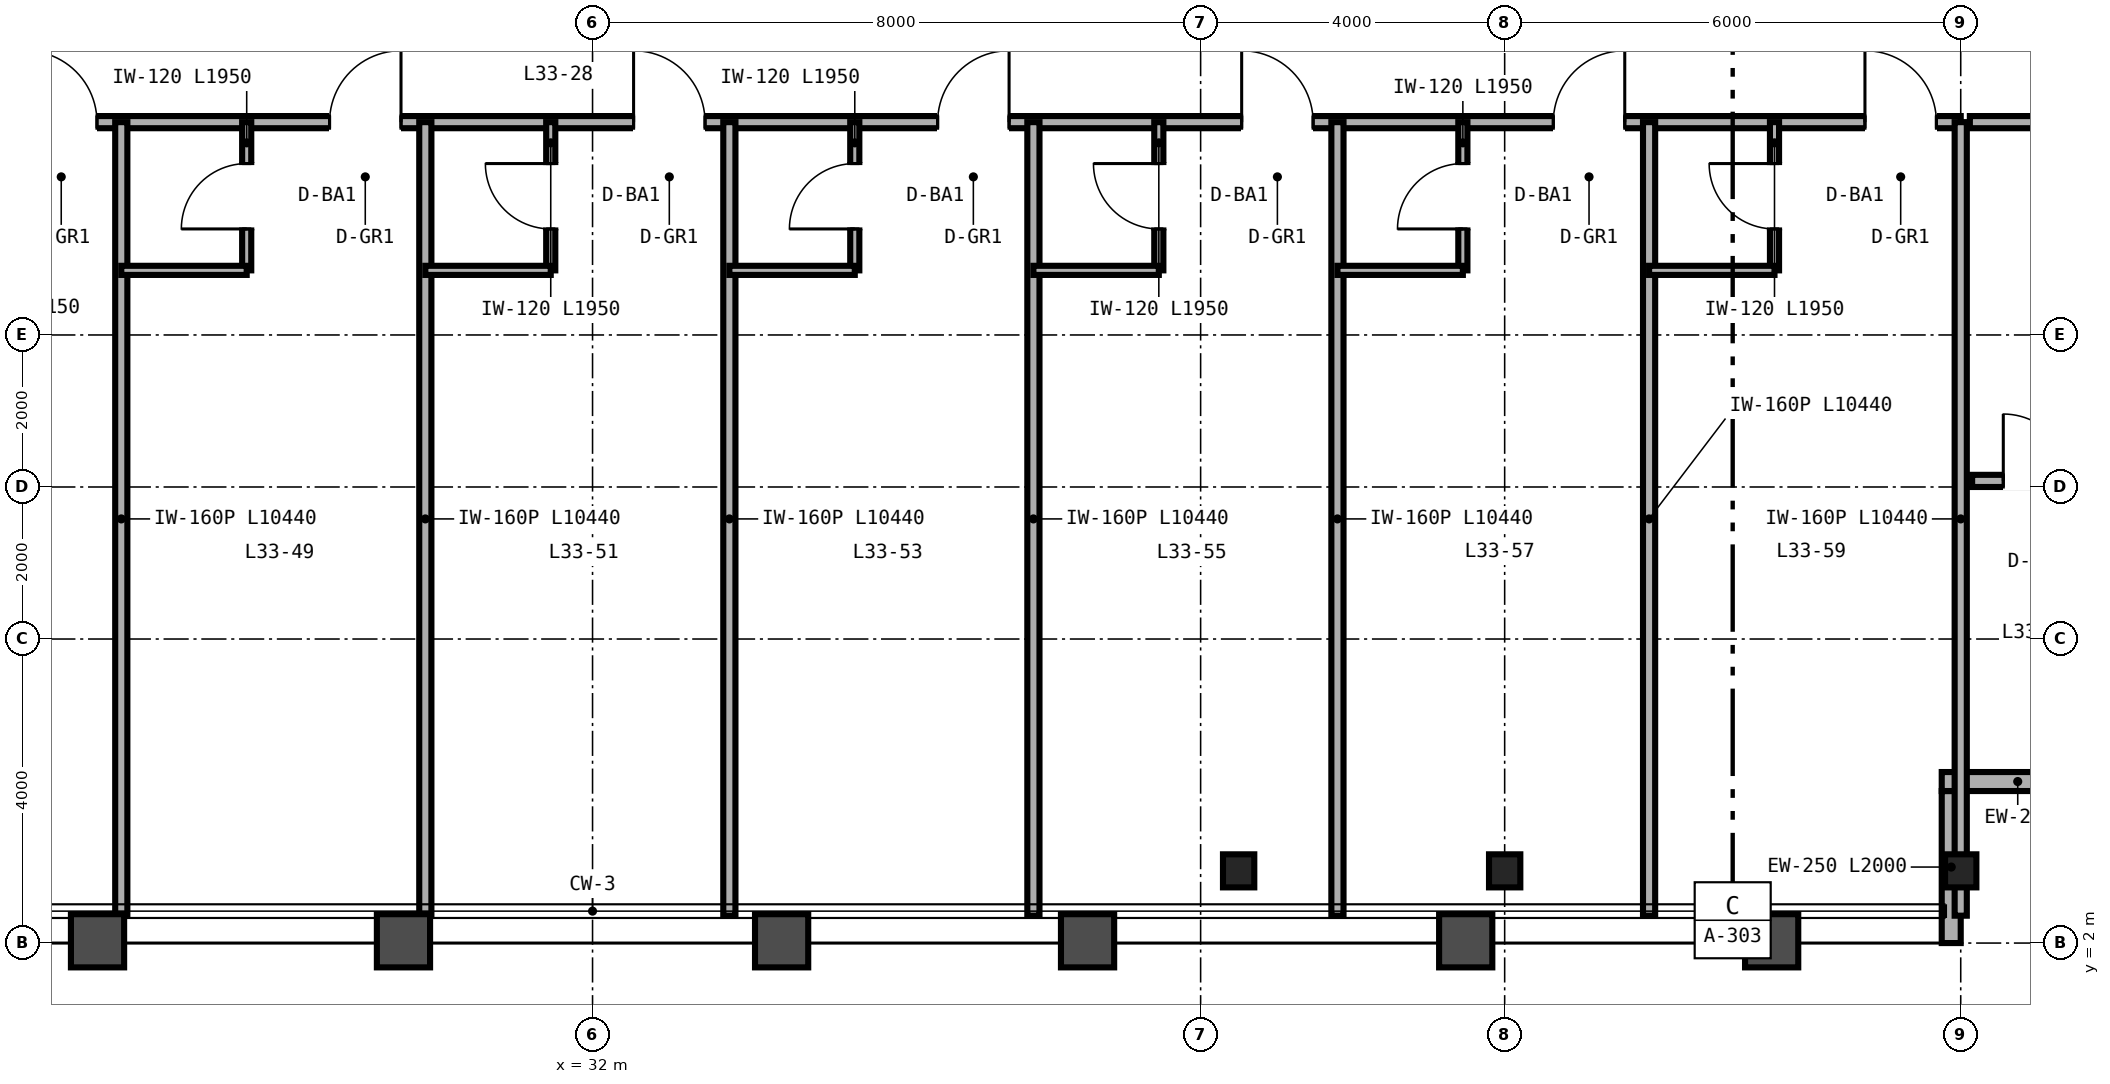
"""IFC4 building model, lengths in metres.
Left out: names, types, materials, properties, quantities, classifications, styles, units other than length and angle.
Written with IfcOpenShell. Run it as: python <this file> out.ifc"""

import sys

from ifc_helpers import new_model, si_unit, direction, frame, frame_2d, origin, origin_2d, place, context, subcontext, project, spatial, rectangle, i_section, extrude, source, transform, mapped, element, fill, save


model = new_model("IFC4")
c1 = context("Model", 3, precision=1e-05, world=origin(), true_north=direction((0.0, 1.0)))
c2 = subcontext(c1, "Body", "Model", "MODEL_VIEW")
j1 = project(units=[si_unit("LENGTHUNIT", "METRE"), si_unit("PLANEANGLEUNIT", "RADIAN")], contexts=[c1])
p1 = place(None, origin())
s1 = spatial("IfcSite", under=j1, at=p1, CompositionType="ELEMENT")
p2 = place(p1, origin())
s2 = spatial("IfcBuilding", under=s1, at=p2, CompositionType="ELEMENT")
p3 = place(p2, frame((0.0, 0.0, 133.2)))
s3 = spatial("IfcBuildingStorey", under=s2, at=p3, CompositionType="ELEMENT", Elevation=133.2)
m1 = source(origin(), c2, "Body", "SweptSolid", [
    extrude(i_section(OverallWidth=0.412, OverallDepth=0.435, WebThickness=0.036, FlangeThickness=0.057, FilletRadius=0.025, at=origin_2d()), origin(), (0.0, 0.0, 1.0), 3.36),
])
for number, where, z_axis, x_axis in (
    (1, (40.5, 2.95, 0.0), (0.0, 0.0, 1.0), (1.0, 0.0, 0.0)),
    (2, (44.0, 2.95, 0.0), (0.0, 0.0, 1.0), (1.0, 0.0, 0.0)),
    (3, (50.0, 2.95, 0.0), (0.0, 0.0, 1.0), (1.0, 0.0, 0.0)),
):
    element("IfcColumn", number, at=place(p3, frame(where, z_axis=z_axis, x_axis=x_axis)), inside=s3, PredefinedType="COLUMN", context=c2, shape_type="MappedRepresentation", body=[
        mapped(m1, transform((0.0, 0.0, 0.0), scale=1.0)),
    ])
p4 = place(p3, frame((49.875, 2.0, 0.0), z_axis=(0.0, 0.0, 1.0), x_axis=(0.0, 1.0, 0.0)))
e4 = element("IfcWall", 4, at=p4, inside=s3, PredefinedType="SOLIDWALL", context=c2, shape_type="SweptSolid", body=[
    extrude(rectangle(XDim=2.0, YDim=0.25, at=frame_2d((1.0, 0.0))), origin(), (0.0, 0.0, 1.0), 2.667),
])
p5 = place(p3, frame((49.75, 4.125, 0.0), z_axis=(0.0, 0.0, 1.0), x_axis=(1.0, 0.0, 0.0)))
e5 = element("IfcWall", 5, at=p5, inside=s3, PredefinedType="SOLIDWALL", context=c2, shape_type="SweptSolid", body=[
    extrude(rectangle(XDim=2.0, YDim=0.25, at=frame_2d((1.0, 0.0))), origin(), (0.0, 0.0, 1.0), 3.36),
])
p6 = place(p3, frame((50.12, 12.8, 0.0), z_axis=(0.0, 0.0, 1.0), x_axis=(1.0, 0.0, 0.0)))
e6 = element("IfcWall", 6, at=p6, inside=s3, PredefinedType="PARTITIONING", context=c2, shape_type="SweptSolid", body=[
    extrude(rectangle(XDim=5.68, YDim=0.16, at=frame_2d((2.84, 0.0))), origin(), (0.0, 0.0, 1.0), 3.36),
])
p7 = place(p6, frame((2.36, 0.0, 0.0)))
e7 = element("IfcOpeningElement", 7, at=p7, cuts=e6, PredefinedType="OPENING", context=c2, shape_type="SweptSolid", body=[
    extrude(rectangle(XDim=0.96, YDim=2.15, at=frame_2d((0.48, 1.075))), frame((0.0, 0.09, 0.0), z_axis=(0.0, -1.0, 0.0), x_axis=(1.0, 0.0, 0.0)), (0.0, 0.0, 1.0), 0.18),
])
p8 = place(p3, frame((50.15, 8.08, 0.0), z_axis=(0.0, 0.0, 1.0), x_axis=(1.0, 0.0, 0.0)))
e8 = element("IfcWall", 8, at=p8, inside=s3, PredefinedType="PARTITIONING", context=c2, shape_type="SweptSolid", body=[
    extrude(rectangle(XDim=1.7, YDim=0.16, at=frame_2d((0.85, 0.0))), origin(), (0.0, 0.0, 1.0), 3.36),
])
p9 = place(p8, frame((0.41, 0.0, 0.0)))
e9 = element("IfcOpeningElement", 9, at=p9, cuts=e8, PredefinedType="OPENING", context=c2, shape_type="SweptSolid", body=[
    extrude(rectangle(XDim=0.88, YDim=2.15, at=frame_2d((0.44, 1.075))), frame((0.0, 0.09, 0.0), z_axis=(0.0, -1.0, 0.0), x_axis=(1.0, 0.0, 0.0)), (0.0, 0.0, 1.0), 0.18),
])
p10 = place(p3, frame((14.0, 12.8, 0.0), z_axis=(0.0, 0.0, 1.0), x_axis=(1.0, 0.0, 0.0)))
e10 = element("IfcWall", 10, at=p10, inside=s3, PredefinedType="PARTITIONING", context=c2, shape_type="SweptSolid", body=[
    extrude(rectangle(XDim=36.0, YDim=0.16, at=frame_2d((18.0, 0.0))), origin(), (0.0, 0.0, 1.0), 2.581),
])
p11 = place(p10, frame((2.64, 0.0, 0.0)))
e11 = element("IfcOpeningElement", 11, at=p11, cuts=e10, PredefinedType="OPENING", context=c2, shape_type="SweptSolid", body=[
    extrude(rectangle(XDim=0.94, YDim=2.15, at=frame_2d((0.47, 1.075))), frame((0.0, 0.09, 0.0), z_axis=(0.0, -1.0, 0.0), x_axis=(1.0, 0.0, 0.0)), (0.0, 0.0, 1.0), 0.18),
])
p12 = place(p10, frame((6.54, 0.0, 0.0)))
e12 = element("IfcOpeningElement", 12, at=p12, cuts=e10, PredefinedType="OPENING", context=c2, shape_type="SweptSolid", body=[
    extrude(rectangle(XDim=0.94, YDim=2.15, at=frame_2d((0.47, 1.075))), frame((0.0, 0.09, 0.0), z_axis=(0.0, -1.0, 0.0), x_axis=(1.0, 0.0, 0.0)), (0.0, 0.0, 1.0), 0.18),
])
p13 = place(p10, frame((10.54, 0.0, 0.0)))
e13 = element("IfcOpeningElement", 13, at=p13, cuts=e10, PredefinedType="OPENING", context=c2, shape_type="SweptSolid", body=[
    extrude(rectangle(XDim=0.94, YDim=2.15, at=frame_2d((0.47, 1.075))), frame((0.0, 0.09, 0.0), z_axis=(0.0, -1.0, 0.0), x_axis=(1.0, 0.0, 0.0)), (0.0, 0.0, 1.0), 0.18),
])
p14 = place(p10, frame((14.54, 0.0, 0.0)))
e14 = element("IfcOpeningElement", 14, at=p14, cuts=e10, PredefinedType="OPENING", context=c2, shape_type="SweptSolid", body=[
    extrude(rectangle(XDim=0.94, YDim=2.15, at=frame_2d((0.47, 1.075))), frame((0.0, 0.09, 0.0), z_axis=(0.0, -1.0, 0.0), x_axis=(1.0, 0.0, 0.0)), (0.0, 0.0, 1.0), 0.18),
])
p15 = place(p10, frame((18.54, 0.0, 0.0)))
e15 = element("IfcOpeningElement", 15, at=p15, cuts=e10, PredefinedType="OPENING", context=c2, shape_type="SweptSolid", body=[
    extrude(rectangle(XDim=0.94, YDim=2.15, at=frame_2d((0.47, 1.075))), frame((0.0, 0.09, 0.0), z_axis=(0.0, -1.0, 0.0), x_axis=(1.0, 0.0, 0.0)), (0.0, 0.0, 1.0), 0.18),
])
p16 = place(p10, frame((22.54, 0.0, 0.0)))
e16 = element("IfcOpeningElement", 16, at=p16, cuts=e10, PredefinedType="OPENING", context=c2, shape_type="SweptSolid", body=[
    extrude(rectangle(XDim=0.94, YDim=2.15, at=frame_2d((0.47, 1.075))), frame((0.0, 0.09, 0.0), z_axis=(0.0, -1.0, 0.0), x_axis=(1.0, 0.0, 0.0)), (0.0, 0.0, 1.0), 0.18),
])
p17 = place(p10, frame((26.54, 0.0, 0.0)))
e17 = element("IfcOpeningElement", 17, at=p17, cuts=e10, PredefinedType="OPENING", context=c2, shape_type="SweptSolid", body=[
    extrude(rectangle(XDim=0.94, YDim=2.15, at=frame_2d((0.47, 1.075))), frame((0.0, 0.09, 0.0), z_axis=(0.0, -1.0, 0.0), x_axis=(1.0, 0.0, 0.0)), (0.0, 0.0, 1.0), 0.18),
])
p18 = place(p10, frame((30.64, 0.0, 0.0)))
e18 = element("IfcOpeningElement", 18, at=p18, cuts=e10, PredefinedType="OPENING", context=c2, shape_type="SweptSolid", body=[
    extrude(rectangle(XDim=0.94, YDim=2.15, at=frame_2d((0.47, 1.075))), frame((0.0, 0.09, 0.0), z_axis=(0.0, -1.0, 0.0), x_axis=(1.0, 0.0, 0.0)), (0.0, 0.0, 1.0), 0.18),
])
p19 = place(p10, frame((34.74, 0.0, 0.0)))
e19 = element("IfcOpeningElement", 19, at=p19, cuts=e10, PredefinedType="OPENING", context=c2, shape_type="SweptSolid", body=[
    extrude(rectangle(XDim=0.94, YDim=2.15, at=frame_2d((0.47, 1.075))), frame((0.0, 0.09, 0.0), z_axis=(0.0, -1.0, 0.0), x_axis=(1.0, 0.0, 0.0)), (0.0, 0.0, 1.0), 0.18),
])
p20 = place(p3, frame((50.0, 2.36, 0.0), z_axis=(0.0, 0.0, 1.0), x_axis=(0.0, 1.0, 0.0)))
e20 = element("IfcWall", 20, at=p20, inside=s3, PredefinedType="PARTITIONING", context=c2, shape_type="SweptSolid", body=[
    extrude(rectangle(XDim=10.44, YDim=0.16, at=frame_2d((5.22, 0.0))), origin(), (0.0, 0.0, 1.0), 2.667),
])
for number, where, z_axis, x_axis in (
    (21, (25.8, 2.36, 0.0), (0.0, 0.0, 1.0), (0.0, 1.0, 0.0)),
    (22, (29.8, 2.36, 0.0), (0.0, 0.0, 1.0), (0.0, 1.0, 0.0)),
):
    element("IfcWall", number, at=place(p3, frame(where, z_axis=z_axis, x_axis=x_axis)), inside=s3, PredefinedType="PARTITIONING", context=c2, shape_type="SweptSolid", body=[
        extrude(rectangle(XDim=10.44, YDim=0.16, at=frame_2d((5.22, 0.0))), origin(), (0.0, 0.0, 1.0), 2.433),
    ])
p21 = place(p3, frame((27.45, 10.85, 0.0), z_axis=(0.0, 0.0, 1.0), x_axis=(0.0, 1.0, 0.0)))
e23 = element("IfcWall", 23, at=p21, inside=s3, PredefinedType="PARTITIONING", context=c2, shape_type="SweptSolid", body=[
    extrude(rectangle(XDim=1.95, YDim=0.12, at=frame_2d((0.975, 0.0))), origin(), (0.0, 0.0, 1.0), 3.36),
])
p22 = place(p21, frame((0.545, 0.0, 0.0)))
e24 = element("IfcOpeningElement", 24, at=p22, cuts=e23, PredefinedType="OPENING", context=c2, shape_type="SweptSolid", body=[
    extrude(rectangle(XDim=0.86, YDim=2.1, at=frame_2d((0.43, 1.05))), frame((0.0, 0.07, 0.0), z_axis=(0.0, -1.0, 0.0), x_axis=(1.0, 0.0, 0.0)), (0.0, 0.0, 1.0), 0.14),
])
p23 = place(p3, frame((25.8, 10.85, 0.0), z_axis=(0.0, 0.0, 1.0), x_axis=(1.0, 0.0, 0.0)))
e25 = element("IfcWall", 25, at=p23, inside=s3, PredefinedType="PARTITIONING", context=c2, shape_type="SweptSolid", body=[
    extrude(rectangle(XDim=1.65, YDim=0.12, at=frame_2d((0.825, 0.0))), origin(), (0.0, 0.0, 1.0), 3.36),
])
p24 = place(p3, frame((33.8, 2.36, 0.0), z_axis=(0.0, 0.0, 1.0), x_axis=(0.0, 1.0, 0.0)))
e26 = element("IfcWall", 26, at=p24, inside=s3, PredefinedType="PARTITIONING", context=c2, shape_type="SweptSolid", body=[
    extrude(rectangle(XDim=10.44, YDim=0.16, at=frame_2d((5.22, 0.0))), origin(), (0.0, 0.0, 1.0), 2.433),
])
p25 = place(p3, frame((31.45, 10.85, 0.0), z_axis=(0.0, 0.0, 1.0), x_axis=(0.0, 1.0, 0.0)))
e27 = element("IfcWall", 27, at=p25, inside=s3, PredefinedType="PARTITIONING", context=c2, shape_type="SweptSolid", body=[
    extrude(rectangle(XDim=1.95, YDim=0.12, at=frame_2d((0.975, 0.0))), origin(), (0.0, 0.0, 1.0), 3.36),
])
p26 = place(p25, frame((0.545, 0.0, 0.0)))
e28 = element("IfcOpeningElement", 28, at=p26, cuts=e27, PredefinedType="OPENING", context=c2, shape_type="SweptSolid", body=[
    extrude(rectangle(XDim=0.86, YDim=2.1, at=frame_2d((0.43, 1.05))), frame((0.0, 0.07, 0.0), z_axis=(0.0, -1.0, 0.0), x_axis=(1.0, 0.0, 0.0)), (0.0, 0.0, 1.0), 0.14),
])
p27 = place(p3, frame((29.8, 10.85, 0.0), z_axis=(0.0, 0.0, 1.0), x_axis=(1.0, 0.0, 0.0)))
e29 = element("IfcWall", 29, at=p27, inside=s3, PredefinedType="PARTITIONING", context=c2, shape_type="SweptSolid", body=[
    extrude(rectangle(XDim=1.65, YDim=0.12, at=frame_2d((0.825, 0.0))), origin(), (0.0, 0.0, 1.0), 3.36),
])
p28 = place(p3, frame((37.8, 2.36, 0.0), z_axis=(0.0, 0.0, 1.0), x_axis=(0.0, 1.0, 0.0)))
e30 = element("IfcWall", 30, at=p28, inside=s3, PredefinedType="PARTITIONING", context=c2, shape_type="SweptSolid", body=[
    extrude(rectangle(XDim=10.44, YDim=0.16, at=frame_2d((5.22, 0.0))), origin(), (0.0, 0.0, 1.0), 2.433),
])
p29 = place(p3, frame((35.45, 10.85, 0.0), z_axis=(0.0, 0.0, 1.0), x_axis=(0.0, 1.0, 0.0)))
e31 = element("IfcWall", 31, at=p29, inside=s3, PredefinedType="PARTITIONING", context=c2, shape_type="SweptSolid", body=[
    extrude(rectangle(XDim=1.95, YDim=0.12, at=frame_2d((0.975, 0.0))), origin(), (0.0, 0.0, 1.0), 3.36),
])
p30 = place(p29, frame((0.545, 0.0, 0.0)))
e32 = element("IfcOpeningElement", 32, at=p30, cuts=e31, PredefinedType="OPENING", context=c2, shape_type="SweptSolid", body=[
    extrude(rectangle(XDim=0.86, YDim=2.1, at=frame_2d((0.43, 1.05))), frame((0.0, 0.07, 0.0), z_axis=(0.0, -1.0, 0.0), x_axis=(1.0, 0.0, 0.0)), (0.0, 0.0, 1.0), 0.14),
])
p31 = place(p3, frame((33.8, 10.85, 0.0), z_axis=(0.0, 0.0, 1.0), x_axis=(1.0, 0.0, 0.0)))
e33 = element("IfcWall", 33, at=p31, inside=s3, PredefinedType="PARTITIONING", context=c2, shape_type="SweptSolid", body=[
    extrude(rectangle(XDim=1.65, YDim=0.12, at=frame_2d((0.825, 0.0))), origin(), (0.0, 0.0, 1.0), 3.36),
])
p32 = place(p3, frame((41.8, 2.36, 0.0), z_axis=(0.0, 0.0, 1.0), x_axis=(0.0, 1.0, 0.0)))
e34 = element("IfcWall", 34, at=p32, inside=s3, PredefinedType="PARTITIONING", context=c2, shape_type="SweptSolid", body=[
    extrude(rectangle(XDim=10.44, YDim=0.16, at=frame_2d((5.22, 0.0))), origin(), (0.0, 0.0, 1.0), 2.823),
])
p33 = place(p3, frame((39.45, 10.85, 0.0), z_axis=(0.0, 0.0, 1.0), x_axis=(0.0, 1.0, 0.0)))
e35 = element("IfcWall", 35, at=p33, inside=s3, PredefinedType="PARTITIONING", context=c2, shape_type="SweptSolid", body=[
    extrude(rectangle(XDim=1.95, YDim=0.12, at=frame_2d((0.975, 0.0))), origin(), (0.0, 0.0, 1.0), 3.36),
])
p34 = place(p33, frame((0.545, 0.0, 0.0)))
e36 = element("IfcOpeningElement", 36, at=p34, cuts=e35, PredefinedType="OPENING", context=c2, shape_type="SweptSolid", body=[
    extrude(rectangle(XDim=0.86, YDim=2.1, at=frame_2d((0.43, 1.05))), frame((0.0, 0.07, 0.0), z_axis=(0.0, -1.0, 0.0), x_axis=(1.0, 0.0, 0.0)), (0.0, 0.0, 1.0), 0.14),
])
p35 = place(p3, frame((37.8, 10.85, 0.0), z_axis=(0.0, 0.0, 1.0), x_axis=(1.0, 0.0, 0.0)))
e37 = element("IfcWall", 37, at=p35, inside=s3, PredefinedType="PARTITIONING", context=c2, shape_type="SweptSolid", body=[
    extrude(rectangle(XDim=1.65, YDim=0.12, at=frame_2d((0.825, 0.0))), origin(), (0.0, 0.0, 1.0), 3.36),
])
p36 = place(p3, frame((45.9, 2.36, 0.0), z_axis=(0.0, 0.0, 1.0), x_axis=(0.0, 1.0, 0.0)))
e38 = element("IfcWall", 38, at=p36, inside=s3, PredefinedType="PARTITIONING", context=c2, shape_type="SweptSolid", body=[
    extrude(rectangle(XDim=10.44, YDim=0.16, at=frame_2d((5.22, 0.0))), origin(), (0.0, 0.0, 1.0), 2.667),
])
p37 = place(p3, frame((43.45, 10.85, 0.0), z_axis=(0.0, 0.0, 1.0), x_axis=(0.0, 1.0, 0.0)))
e39 = element("IfcWall", 39, at=p37, inside=s3, PredefinedType="PARTITIONING", context=c2, shape_type="SweptSolid", body=[
    extrude(rectangle(XDim=1.95, YDim=0.12, at=frame_2d((0.975, 0.0))), origin(), (0.0, 0.0, 1.0), 3.36),
])
p38 = place(p37, frame((0.545, 0.0, 0.0)))
e40 = element("IfcOpeningElement", 40, at=p38, cuts=e39, PredefinedType="OPENING", context=c2, shape_type="SweptSolid", body=[
    extrude(rectangle(XDim=0.86, YDim=2.1, at=frame_2d((0.43, 1.05))), frame((0.0, 0.07, 0.0), z_axis=(0.0, -1.0, 0.0), x_axis=(1.0, 0.0, 0.0)), (0.0, 0.0, 1.0), 0.14),
])
p39 = place(p3, frame((41.8, 10.85, 0.0), z_axis=(0.0, 0.0, 1.0), x_axis=(1.0, 0.0, 0.0)))
e41 = element("IfcWall", 41, at=p39, inside=s3, PredefinedType="PARTITIONING", context=c2, shape_type="SweptSolid", body=[
    extrude(rectangle(XDim=1.65, YDim=0.12, at=frame_2d((0.825, 0.0))), origin(), (0.0, 0.0, 1.0), 3.36),
])
p40 = place(p3, frame((47.55, 10.85, 0.0), z_axis=(0.0, 0.0, 1.0), x_axis=(0.0, 1.0, 0.0)))
e42 = element("IfcWall", 42, at=p40, inside=s3, PredefinedType="PARTITIONING", context=c2, shape_type="SweptSolid", body=[
    extrude(rectangle(XDim=1.95, YDim=0.12, at=frame_2d((0.975, 0.0))), origin(), (0.0, 0.0, 1.0), 3.36),
])
p41 = place(p40, frame((0.545, 0.0, 0.0)))
e43 = element("IfcOpeningElement", 43, at=p41, cuts=e42, PredefinedType="OPENING", context=c2, shape_type="SweptSolid", body=[
    extrude(rectangle(XDim=0.86, YDim=2.1, at=frame_2d((0.43, 1.05))), frame((0.0, 0.07, 0.0), z_axis=(0.0, -1.0, 0.0), x_axis=(1.0, 0.0, 0.0)), (0.0, 0.0, 1.0), 0.14),
])
p42 = place(p3, frame((45.9, 10.85, 0.0), z_axis=(0.0, 0.0, 1.0), x_axis=(1.0, 0.0, 0.0)))
e44 = element("IfcWall", 44, at=p42, inside=s3, PredefinedType="PARTITIONING", context=c2, shape_type="SweptSolid", body=[
    extrude(rectangle(XDim=1.65, YDim=0.12, at=frame_2d((0.825, 0.0))), origin(), (0.0, 0.0, 1.0), 3.36),
])
m2 = source(origin(), c2, "Body", "SweptSolid", [
    extrude(rectangle(XDim=0.88, YDim=2.15, at=frame_2d((0.44, 1.075))), frame((0.0, 0.025, 0.0), z_axis=(0.0, -1.0, 0.0), x_axis=(1.0, 0.0, 0.0)), (0.0, 0.0, 1.0), 0.05),
])
p43 = place(p9, origin())
e45 = element("IfcDoor", 45, at=p43, inside=s3, OperationType="SINGLE_SWING_LEFT", PredefinedType="DOOR", context=c2, shape_type="MappedRepresentation", body=[
    mapped(m2, transform((0.0, 0.0, 0.0), scale=1.0)),
])
fill(e9, e45)
m3 = source(origin(), c2, "Body", "SweptSolid", [
    extrude(rectangle(XDim=0.86, YDim=2.1, at=frame_2d((0.43, 1.05))), frame((0.0, 0.025, 0.0), z_axis=(0.0, -1.0, 0.0), x_axis=(1.0, 0.0, 0.0)), (0.0, 0.0, 1.0), 0.05),
])
p44 = place(p22, origin())
e46 = element("IfcDoor", 46, at=p44, inside=s3, OperationType="SINGLE_SWING_LEFT", PredefinedType="DOOR", context=c2, shape_type="MappedRepresentation", body=[
    mapped(m3, transform((0.0, 0.0, 0.0), scale=1.0)),
])
fill(e24, e46)
p45 = place(p26, origin())
e47 = element("IfcDoor", 47, at=p45, inside=s3, OperationType="SINGLE_SWING_RIGHT", PredefinedType="DOOR", context=c2, shape_type="MappedRepresentation", body=[
    mapped(m3, transform((0.0, 0.0, 0.0), scale=1.0)),
])
fill(e28, e47)
p46 = place(p30, origin())
e48 = element("IfcDoor", 48, at=p46, inside=s3, OperationType="SINGLE_SWING_LEFT", PredefinedType="DOOR", context=c2, shape_type="MappedRepresentation", body=[
    mapped(m3, transform((0.0, 0.0, 0.0), scale=1.0)),
])
fill(e32, e48)
p47 = place(p34, origin())
e49 = element("IfcDoor", 49, at=p47, inside=s3, OperationType="SINGLE_SWING_RIGHT", PredefinedType="DOOR", context=c2, shape_type="MappedRepresentation", body=[
    mapped(m3, transform((0.0, 0.0, 0.0), scale=1.0)),
])
fill(e36, e49)
p48 = place(p38, origin())
e50 = element("IfcDoor", 50, at=p48, inside=s3, OperationType="SINGLE_SWING_LEFT", PredefinedType="DOOR", context=c2, shape_type="MappedRepresentation", body=[
    mapped(m3, transform((0.0, 0.0, 0.0), scale=1.0)),
])
fill(e40, e50)
p49 = place(p41, origin())
e51 = element("IfcDoor", 51, at=p49, inside=s3, OperationType="SINGLE_SWING_RIGHT", PredefinedType="DOOR", context=c2, shape_type="MappedRepresentation", body=[
    mapped(m3, transform((0.0, 0.0, 0.0), scale=1.0)),
])
fill(e43, e51)
m4 = source(origin(), c2, "Body", "SweptSolid", [
    extrude(rectangle(XDim=0.94, YDim=2.15, at=frame_2d((0.47, 1.075))), frame((0.0, 0.025, 0.0), z_axis=(0.0, -1.0, 0.0), x_axis=(1.0, 0.0, 0.0)), (0.0, 0.0, 1.0), 0.05),
])
p50 = place(p13, origin())
e52 = element("IfcDoor", 52, at=p50, inside=s3, OperationType="SINGLE_SWING_LEFT", PredefinedType="DOOR", context=c2, shape_type="MappedRepresentation", body=[
    mapped(m4, transform((0.0, 0.0, 0.0), scale=1.0)),
])
fill(e13, e52)
p51 = place(p14, origin())
e53 = element("IfcDoor", 53, at=p51, inside=s3, OperationType="SINGLE_SWING_RIGHT", PredefinedType="DOOR", context=c2, shape_type="MappedRepresentation", body=[
    mapped(m4, transform((0.0, 0.0, 0.0), scale=1.0)),
])
fill(e14, e53)
p52 = place(p15, origin())
e54 = element("IfcDoor", 54, at=p52, inside=s3, OperationType="SINGLE_SWING_LEFT", PredefinedType="DOOR", context=c2, shape_type="MappedRepresentation", body=[
    mapped(m4, transform((0.0, 0.0, 0.0), scale=1.0)),
])
fill(e15, e54)
p53 = place(p16, origin())
e55 = element("IfcDoor", 55, at=p53, inside=s3, OperationType="SINGLE_SWING_RIGHT", PredefinedType="DOOR", context=c2, shape_type="MappedRepresentation", body=[
    mapped(m4, transform((0.0, 0.0, 0.0), scale=1.0)),
])
fill(e16, e55)
p54 = place(p17, origin())
e56 = element("IfcDoor", 56, at=p54, inside=s3, OperationType="SINGLE_SWING_LEFT", PredefinedType="DOOR", context=c2, shape_type="MappedRepresentation", body=[
    mapped(m4, transform((0.0, 0.0, 0.0), scale=1.0)),
])
fill(e17, e56)
p55 = place(p18, origin())
e57 = element("IfcDoor", 57, at=p55, inside=s3, OperationType="SINGLE_SWING_RIGHT", PredefinedType="DOOR", context=c2, shape_type="MappedRepresentation", body=[
    mapped(m4, transform((0.0, 0.0, 0.0), scale=1.0)),
])
fill(e18, e57)
p56 = place(p19, origin())
e58 = element("IfcDoor", 58, at=p56, inside=s3, OperationType="SINGLE_SWING_LEFT", PredefinedType="DOOR", context=c2, shape_type="MappedRepresentation", body=[
    mapped(m4, transform((0.0, 0.0, 0.0), scale=1.0)),
])
fill(e19, e58)
save(model, sys.argv[1])
